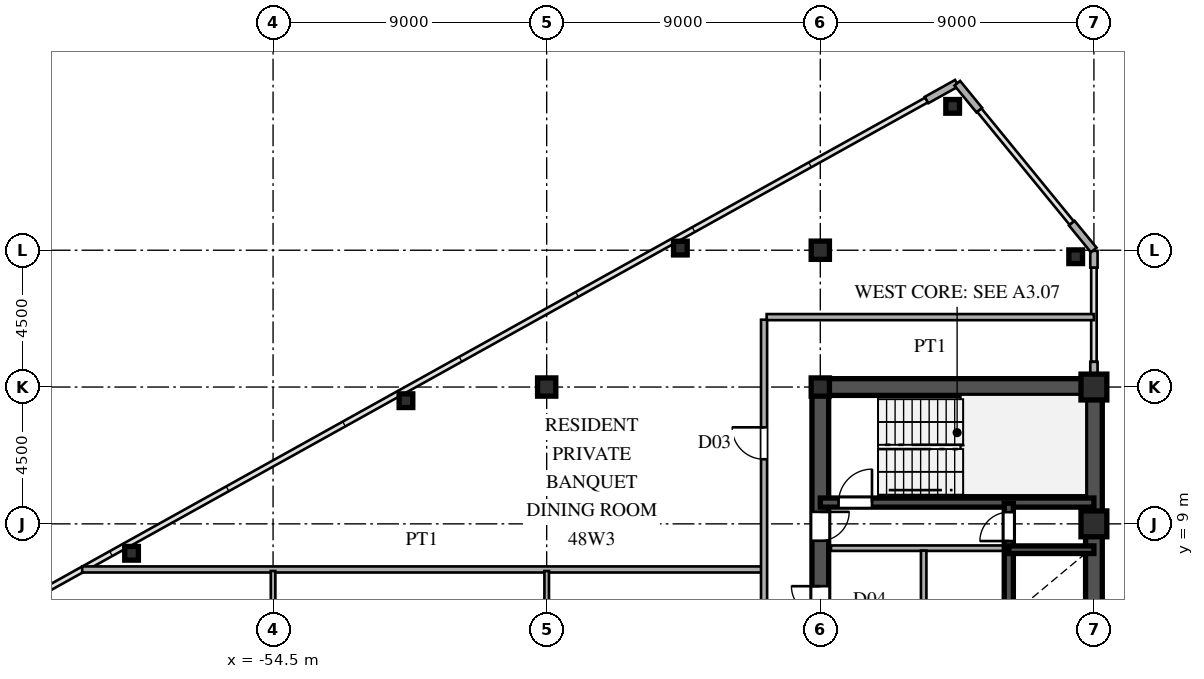
"""IFC4 building model, lengths in metres.
Left out: names, types, materials, properties, quantities, classifications, styles, units other than length and angle.
Written with IfcOpenShell. Run it as: python <this file> out.ifc"""

import sys

from ifc_helpers import new_model, si_unit, direction, frame, frame_2d, origin, origin_2d, place, context, subcontext, project, spatial, rectangle, hollow_rectangle, i_section, extrude, source, transform, mapped, element, fill, save


model = new_model("IFC4")
c1 = context("Model", 3, precision=1e-05, world=origin(), true_north=direction((0.0, 1.0)))
c2 = subcontext(c1, "Body", "Model", "MODEL_VIEW")
j1 = project(units=[si_unit("LENGTHUNIT", "METRE"), si_unit("PLANEANGLEUNIT", "RADIAN")], contexts=[c1])
p1 = place(None, origin())
s1 = spatial("IfcSite", under=j1, at=p1, CompositionType="ELEMENT")
p2 = place(p1, origin())
s2 = spatial("IfcBuilding", under=s1, at=p2, CompositionType="ELEMENT")
p3 = place(p2, frame((0.0, 0.0, 181.5)))
s3 = spatial("IfcBuildingStorey", under=s2, at=p3, CompositionType="ELEMENT", Elevation=181.5)
m1 = source(origin(), c2, "Body", "SweptSolid", [
    extrude(hollow_rectangle(XDim=0.85, YDim=0.85, WallThickness=0.036, at=origin_2d()), origin(), (0.0, 0.0, 1.0), 3.6),
])
for number, where, z_axis, x_axis in (
    (1, (-27.5, 9.0, 0.0), (0.0, 0.0, 1.0), (1.0, 0.0, 0.0)),
    (2, (-27.5, 13.5, 0.0), (0.0, 0.0, 1.0), (1.0, 0.0, 0.0)),
):
    element("IfcColumn", number, at=place(p3, frame(where, z_axis=z_axis, x_axis=x_axis)), inside=s3, PredefinedType="COLUMN", context=c2, shape_type="MappedRepresentation", body=[
        mapped(m1, transform((0.0, 0.0, 0.0), scale=1.0)),
    ])
m2 = source(origin(), c2, "Body", "SweptSolid", [
    extrude(i_section(OverallWidth=0.6, OverallDepth=0.6, WebThickness=0.025, FlangeThickness=0.04, at=origin_2d()), origin(), (0.0, 0.0, 1.0), 3.6),
])
for number, where, z_axis, x_axis in (
    (3, (-36.5, 13.5, 0.0), (0.0, 0.0, 1.0), (1.0, 0.0, 0.0)),
    (4, (-36.5, 18.0, 0.0), (0.0, 0.0, 1.0), (1.0, 0.0, 0.0)),
    (5, (-45.5, 13.5, 0.0), (0.0, 0.0, 1.0), (1.0, 0.0, 0.0)),
):
    element("IfcColumn", number, at=place(p3, frame(where, z_axis=z_axis, x_axis=x_axis)), inside=s3, PredefinedType="COLUMN", context=c2, shape_type="MappedRepresentation", body=[
        mapped(m2, transform((0.0, 0.0, 0.0), scale=1.0)),
    ])
m3 = source(origin(), c2, "Body", "SweptSolid", [
    extrude(hollow_rectangle(XDim=0.45, YDim=0.45, WallThickness=0.018, at=origin_2d()), origin(), (0.0, 0.0, 1.0), 3.6),
])
for number, where, z_axis, x_axis in (
    (6, (-28.1, 17.786, 0.0), (0.0, 0.0, 1.0), (1.0, 0.0, 0.0)),
    (7, (-32.147, 22.732, 0.0), (0.0, 0.0, 1.0), (1.0, 0.0, 0.0)),
    (8, (-41.104, 18.071, 0.0), (0.0, 0.0, 1.0), (1.0, 0.0, 0.0)),
    (9, (-50.129, 13.051, 0.0), (0.0, 0.0, 1.0), (1.0, 0.0, 0.0)),
    (10, (-59.155, 8.031, 0.0), (0.0, 0.0, 1.0), (1.0, 0.0, 0.0)),
):
    element("IfcColumn", number, at=place(p3, frame(where, z_axis=z_axis, x_axis=x_axis)), inside=s3, PredefinedType="COLUMN", context=c2, shape_type="MappedRepresentation", body=[
        mapped(m3, transform((0.0, 0.0, 0.0), scale=1.0)),
    ])
p4 = place(p3, frame((-27.5, 13.78, 0.0), z_axis=(0.0, 0.0, 1.0), x_axis=(0.0, 1.0, 0.0)))
e11 = element("IfcWall", 11, at=p4, inside=s3, PredefinedType="SOLIDWALL", context=c2, shape_type="SweptSolid", body=[
    extrude(rectangle(XDim=0.55, YDim=0.24, at=frame_2d((0.275, 0.0))), origin(), (0.0, 0.0, 1.0), 2.88),
])
p5 = place(p3, frame((-27.5, 17.43, 0.0), z_axis=(0.0, 0.0, 1.0), x_axis=(0.0, 1.0, 0.0)))
e12 = element("IfcWall", 12, at=p5, inside=s3, PredefinedType="SOLIDWALL", context=c2, shape_type="SweptSolid", body=[
    extrude(rectangle(XDim=0.55, YDim=0.24, at=frame_2d((0.275, 0.0))), origin(), (0.0, 0.0, 1.0), 3.38),
])
for number, where, z_axis, x_axis in (
    (13, (-27.506, 18.008, 0.0), (0.0, 0.0, 1.0), (-0.633, 0.774, 0.0)),
    (14, (-31.272, 22.61, 0.0), (0.0, 0.0, 1.0), (-0.633, 0.774, 0.0)),
):
    element("IfcWall", number, at=place(p3, frame(where, z_axis=z_axis, x_axis=x_axis)), inside=s3, PredefinedType="SOLIDWALL", context=c2, shape_type="SweptSolid", body=[
        extrude(rectangle(XDim=1.14, YDim=0.24, at=frame_2d((0.57, 0.0))), origin(), (0.0, 0.0, 1.0), 3.38),
    ])
p6 = place(p3, frame((-32.009, 23.495, 0.0), z_axis=(0.0, 0.0, 1.0), x_axis=(-0.87385402111, -0.486188389196, 0.0)))
e15 = element("IfcWall", 15, at=p6, inside=s3, PredefinedType="SOLIDWALL", context=c2, shape_type="SweptSolid", body=[
    extrude(rectangle(XDim=1.14, YDim=0.24, at=frame_2d((0.57, 0.0))), origin(), (0.0, 0.0, 1.0), 3.38),
])
p7 = place(p3, frame((-27.5, 1.3, 0.0), z_axis=(0.0, 0.0, 1.0), x_axis=(0.0, 1.0, 0.0)))
e16 = element("IfcWall", 16, at=p7, inside=s3, PredefinedType="SHEAR", context=c2, shape_type="SweptSolid", body=[
    extrude(rectangle(XDim=12.2, YDim=0.55, at=frame_2d((6.1, 0.0))), origin(), (0.0, 0.0, 1.0), 3.38),
])
p8 = place(p3, frame((-36.5, 13.5, 0.0), z_axis=(0.0, 0.0, 1.0), x_axis=(1.0, 0.0, 0.0)))
e17 = element("IfcWall", 17, at=p8, inside=s3, PredefinedType="SHEAR", context=c2, shape_type="SweptSolid", body=[
    extrude(rectangle(XDim=9.0, YDim=0.55, at=frame_2d((4.5, 0.0))), origin(), (0.0, 0.0, 1.0), 3.38),
])
p9 = place(p3, frame((-36.5, 8.2, 0.0), z_axis=(0.0, 0.0, 1.0), x_axis=(0.0, 1.0, 0.0)))
e18 = element("IfcWall", 18, at=p9, inside=s3, PredefinedType="SHEAR", context=c2, shape_type="SweptSolid", body=[
    extrude(rectangle(XDim=5.45, YDim=0.55, at=frame_2d((2.725, 0.0))), origin(), (0.0, 0.0, 1.0), 3.38),
])
p10 = place(p9, frame((0.245, 0.0, 0.0)))
e19 = element("IfcOpeningElement", 19, at=p10, cuts=e18, PredefinedType="OPENING", context=c2, shape_type="SweptSolid", body=[
    extrude(rectangle(XDim=0.95, YDim=2.15, at=frame_2d((0.475, 1.075))), frame((0.0, 0.285, 0.0), z_axis=(0.0, -1.0, 0.0), x_axis=(1.0, 0.0, 0.0)), (0.0, 0.0, 1.0), 0.57),
])
p11 = place(p3, frame((-36.5, 4.75, 0.0), z_axis=(0.0, 0.0, 1.0), x_axis=(0.0, 1.0, 0.0)))
e20 = element("IfcWall", 20, at=p11, inside=s3, PredefinedType="SHEAR", context=c2, shape_type="SweptSolid", body=[
    extrude(rectangle(XDim=3.45, YDim=0.55, at=frame_2d((1.725, 0.0))), origin(), (0.0, 0.0, 1.0), 3.38),
])
p12 = place(p11, frame((1.25, 0.0, 0.0)))
e21 = element("IfcOpeningElement", 21, at=p12, cuts=e20, PredefinedType="OPENING", context=c2, shape_type="SweptSolid", body=[
    extrude(rectangle(XDim=0.95, YDim=2.15, at=frame_2d((0.475, 1.075))), frame((0.0, 0.285, 0.0), z_axis=(0.0, -1.0, 0.0), x_axis=(1.0, 0.0, 0.0)), (0.0, 0.0, 1.0), 0.57),
])
p13 = place(p3, frame((-36.5, 9.7, 0.0), z_axis=(0.0, 0.0, 1.0), x_axis=(1.0, 0.0, 0.0)))
e22 = element("IfcWall", 22, at=p13, inside=s3, PredefinedType="SHEAR", context=c2, shape_type="SweptSolid", body=[
    extrude(rectangle(XDim=9.0, YDim=0.3, at=frame_2d((4.5, 0.0))), origin(), (0.0, 0.0, 1.0), 3.38),
])
p14 = place(p13, frame((0.6, 0.0, 0.0)))
e23 = element("IfcOpeningElement", 23, at=p14, cuts=e22, PredefinedType="OPENING", context=c2, shape_type="SweptSolid", body=[
    extrude(rectangle(XDim=1.1, YDim=2.2, at=frame_2d((0.55, 1.1))), frame((0.0, 0.16, 0.0), z_axis=(0.0, -1.0, 0.0), x_axis=(1.0, 0.0, 0.0)), (0.0, 0.0, 1.0), 0.32),
])
p15 = place(p3, frame((-30.3, 8.15, 0.0), z_axis=(0.0, 0.0, 1.0), x_axis=(1.0, 0.0, 0.0)))
e24 = element("IfcWall", 24, at=p15, inside=s3, PredefinedType="SHEAR", context=c2, shape_type="SweptSolid", body=[
    extrude(rectangle(XDim=2.8, YDim=0.25, at=frame_2d((1.4, 0.0))), origin(), (0.0, 0.0, 1.0), 3.38),
])
p16 = place(p3, frame((-30.3, 5.9, 0.0), z_axis=(0.0, 0.0, 1.0), x_axis=(0.0, 1.0, 0.0)))
e25 = element("IfcWall", 25, at=p16, inside=s3, PredefinedType="SHEAR", context=c2, shape_type="SweptSolid", body=[
    extrude(rectangle(XDim=2.25, YDim=0.3, at=frame_2d((1.125, 0.0))), origin(), (0.0, 0.0, 1.0), 3.38),
])
p17 = place(p3, frame((-30.3, 8.15, 0.0), z_axis=(0.0, 0.0, 1.0), x_axis=(0.0, 1.0, 0.0)))
e26 = element("IfcWall", 26, at=p17, inside=s3, PredefinedType="SHEAR", context=c2, shape_type="SweptSolid", body=[
    extrude(rectangle(XDim=1.53, YDim=0.3, at=frame_2d((0.765, 0.0))), origin(), (0.0, 0.0, 1.0), 3.38),
])
p18 = place(p17, frame((0.285, 0.0, 0.0)))
e27 = element("IfcOpeningElement", 27, at=p18, cuts=e26, PredefinedType="OPENING", context=c2, shape_type="SweptSolid", body=[
    extrude(rectangle(XDim=0.95, YDim=2.15, at=frame_2d((0.475, 1.075))), frame((0.0, 0.16, 0.0), z_axis=(0.0, -1.0, 0.0), x_axis=(1.0, 0.0, 0.0)), (0.0, 0.0, 1.0), 0.32),
])
p19 = place(p3, frame((-36.15, 8.2, 0.0), z_axis=(0.0, 0.0, 1.0), x_axis=(1.0, 0.0, 0.0)))
e28 = element("IfcWall", 28, at=p19, inside=s3, PredefinedType="PARTITIONING", context=c2, shape_type="SweptSolid", body=[
    extrude(rectangle(XDim=5.7, YDim=0.18, at=frame_2d((2.85, 0.0))), origin(), (0.0, 0.0, 1.0), 3.38),
])
p20 = place(p3, frame((-33.1, 1.38, 0.0), z_axis=(0.0, 0.0, 1.0), x_axis=(0.0, 1.0, 0.0)))
e29 = element("IfcWall", 29, at=p20, inside=s3, PredefinedType="PARTITIONING", context=c2, shape_type="SweptSolid", body=[
    extrude(rectangle(XDim=6.74, YDim=0.18, at=frame_2d((3.37, 0.0))), origin(), (0.0, 0.0, 1.0), 3.38),
])
p21 = place(p3, frame((-60.779, 7.5, 0.0), z_axis=(0.0, 0.0, 1.0), x_axis=(1.0, 0.0, 0.0)))
e30 = element("IfcWall", 30, at=p21, inside=s3, PredefinedType="PARTITIONING", context=c2, shape_type="SweptSolid", body=[
    extrude(rectangle(XDim=22.349, YDim=0.2, at=frame_2d((11.175, 0.0))), origin(), (0.0, 0.0, 1.0), 3.38),
])
p22 = place(p3, frame((-38.265, 15.8, 0.0), z_axis=(0.0, 0.0, 1.0), x_axis=(1.0, 0.0, 0.0)))
e31 = element("IfcWall", 31, at=p22, inside=s3, PredefinedType="PARTITIONING", context=c2, shape_type="SweptSolid", body=[
    extrude(rectangle(XDim=10.765, YDim=0.2, at=frame_2d((5.382, 0.0))), origin(), (0.0, 0.0, 1.0), 3.38),
])
p23 = place(p3, frame((-54.5, -6.45, 0.0), z_axis=(0.0, 0.0, 1.0), x_axis=(0.0, 1.0, 0.0)))
e32 = element("IfcWall", 32, at=p23, inside=s3, PredefinedType="PARTITIONING", context=c2, shape_type="SweptSolid", body=[
    extrude(rectangle(XDim=13.9, YDim=0.15, at=frame_2d((6.95, 0.0))), origin(), (0.0, 0.0, 1.0), 2.78),
])
p24 = place(p23, frame((6.475, 0.0, 0.0)))
e33 = element("IfcOpeningElement", 33, at=p24, cuts=e32, PredefinedType="OPENING", context=c2, shape_type="SweptSolid", body=[
    extrude(rectangle(XDim=0.95, YDim=2.15, at=frame_2d((0.475, 1.075))), frame((0.0, 0.085, 0.0), z_axis=(0.0, -1.0, 0.0), x_axis=(1.0, 0.0, 0.0)), (0.0, 0.0, 1.0), 0.17),
])
p25 = place(p3, frame((-45.5, 3.352, 0.0), z_axis=(0.0, 0.0, 1.0), x_axis=(0.0, 1.0, 0.0)))
e34 = element("IfcWall", 34, at=p25, inside=s3, PredefinedType="PARTITIONING", context=c2, shape_type="SweptSolid", body=[
    extrude(rectangle(XDim=4.098, YDim=0.15, at=frame_2d((2.049, 0.0))), origin(), (0.0, 0.0, 1.0), 2.78),
])
p26 = place(p3, frame((-38.35, -15.715, 0.0), z_axis=(0.0, 0.0, 1.0), x_axis=(0.0, 1.0, 0.0)))
e35 = element("IfcWall", 35, at=p26, inside=s3, PredefinedType="PARTITIONING", context=c2, shape_type="SweptSolid", body=[
    extrude(rectangle(XDim=31.43, YDim=0.2, at=frame_2d((15.715, 0.0))), origin(), (0.0, 0.0, 1.0), 3.38),
])
p27 = place(p26, frame((7.292, 0.0, 0.0)))
e36 = element("IfcOpeningElement", 36, at=p27, cuts=e35, PredefinedType="OPENING", context=c2, shape_type="SweptSolid", body=[
    extrude(rectangle(XDim=1.05, YDim=2.25, at=frame_2d((0.525, 1.125))), frame((0.0, 0.11, 0.0), z_axis=(0.0, -1.0, 0.0), x_axis=(1.0, 0.0, 0.0)), (0.0, 0.0, 1.0), 0.22),
])
p28 = place(p26, frame((15.48, 0.0, 0.0)))
e37 = element("IfcOpeningElement", 37, at=p28, cuts=e35, PredefinedType="OPENING", context=c2, shape_type="SweptSolid", body=[
    extrude(rectangle(XDim=1.05, YDim=2.25, at=frame_2d((0.525, 1.125))), frame((0.0, 0.11, 0.0), z_axis=(0.0, -1.0, 0.0), x_axis=(1.0, 0.0, 0.0)), (0.0, 0.0, 1.0), 0.22),
])
p29 = place(p26, frame((26.84, 0.0, 0.0)))
e38 = element("IfcOpeningElement", 38, at=p29, cuts=e35, PredefinedType="OPENING", context=c2, shape_type="SweptSolid", body=[
    extrude(rectangle(XDim=1.05, YDim=2.25, at=frame_2d((0.525, 1.125))), frame((0.0, 0.11, 0.0), z_axis=(0.0, -1.0, 0.0), x_axis=(1.0, 0.0, 0.0)), (0.0, 0.0, 1.0), 0.22),
])
m4 = source(origin(), c2, "Body", "SweptSolid", [
    extrude(rectangle(XDim=0.95, YDim=2.15, at=frame_2d((0.475, 1.075))), frame((0.0, 0.025, 0.0), z_axis=(0.0, -1.0, 0.0), x_axis=(1.0, 0.0, 0.0)), (0.0, 0.0, 1.0), 0.05),
])
p30 = place(p10, frame((0.95, 0.0, 0.0), z_axis=(0.0, 0.0, 1.0), x_axis=(-1.0, 0.0, 0.0)))
e39 = element("IfcDoor", 39, at=p30, inside=s3, OperationType="SINGLE_SWING_RIGHT", PredefinedType="DOOR", context=c2, shape_type="MappedRepresentation", body=[
    mapped(m4, transform((0.0, 0.0, 0.0), scale=1.0)),
])
fill(e19, e39)
p31 = place(p12, origin())
e40 = element("IfcDoor", 40, at=p31, inside=s3, OperationType="SINGLE_SWING_RIGHT", PredefinedType="DOOR", context=c2, shape_type="MappedRepresentation", body=[
    mapped(m4, transform((0.0, 0.0, 0.0), scale=1.0)),
])
fill(e21, e40)
m5 = source(origin(), c2, "Body", "SweptSolid", [
    extrude(rectangle(XDim=1.1, YDim=2.2, at=frame_2d((0.55, 1.1))), frame((0.0, 0.025, 0.0), z_axis=(0.0, -1.0, 0.0), x_axis=(1.0, 0.0, 0.0)), (0.0, 0.0, 1.0), 0.05),
])
p32 = place(p14, origin())
e41 = element("IfcDoor", 41, at=p32, inside=s3, OperationType="SINGLE_SWING_RIGHT", PredefinedType="DOOR", context=c2, shape_type="MappedRepresentation", body=[
    mapped(m5, transform((0.0, 0.0, 0.0), scale=1.0)),
])
fill(e23, e41)
p33 = place(p18, origin())
e42 = element("IfcDoor", 42, at=p33, inside=s3, OperationType="SINGLE_SWING_LEFT", PredefinedType="DOOR", context=c2, shape_type="MappedRepresentation", body=[
    mapped(m4, transform((0.0, 0.0, 0.0), scale=1.0)),
])
fill(e27, e42)
m6 = source(origin(), c2, "Body", "SweptSolid", [
    extrude(rectangle(XDim=1.05, YDim=2.25, at=frame_2d((0.525, 1.125))), frame((0.0, 0.025, 0.0), z_axis=(0.0, -1.0, 0.0), x_axis=(1.0, 0.0, 0.0)), (0.0, 0.0, 1.0), 0.05),
])
p34 = place(p29, origin())
e43 = element("IfcDoor", 43, at=p34, inside=s3, OperationType="SINGLE_SWING_RIGHT", PredefinedType="DOOR", context=c2, shape_type="MappedRepresentation", body=[
    mapped(m6, transform((0.0, 0.0, 0.0), scale=1.0)),
])
fill(e38, e43)
save(model, sys.argv[1])
